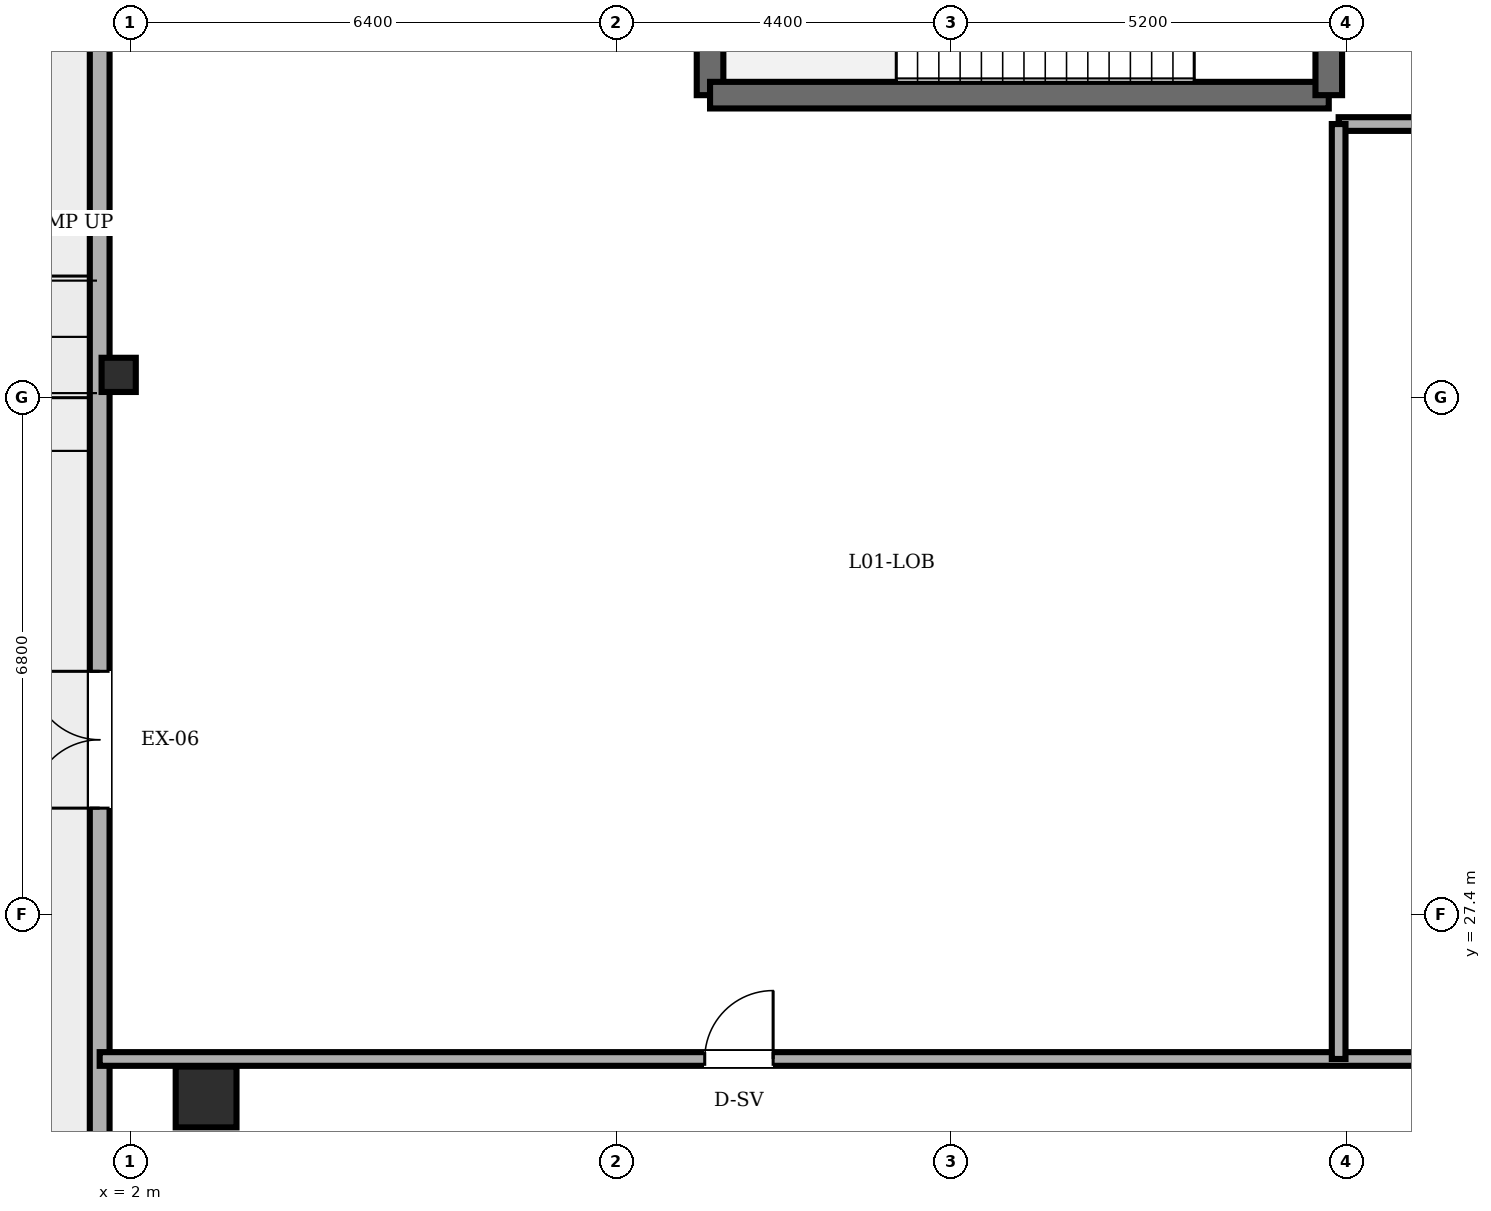
"""IFC4 building model, lengths in metres.
Left out: names, types, materials, properties, quantities, classifications, styles, units other than length and angle.
Written with IfcOpenShell. Run it as: python <this file> out.ifc"""

import sys

from ifc_helpers import new_model, si_unit, direction, frame, frame_2d, origin, origin_2d, place, context, subcontext, project, spatial, rectangle, extrude, element, fill, save


model = new_model("IFC4")
c1 = context("Model", 3, precision=1e-05, world=origin(), true_north=direction((0.0, 1.0)))
c2 = subcontext(c1, "Body", "Model", "MODEL_VIEW")
j1 = project(units=[si_unit("LENGTHUNIT", "METRE"), si_unit("PLANEANGLEUNIT", "RADIAN")], contexts=[c1])
p1 = place(None, origin())
s1 = spatial("IfcSite", under=j1, at=p1, CompositionType="ELEMENT")
p2 = place(p1, origin())
s2 = spatial("IfcBuilding", under=s1, at=p2, CompositionType="ELEMENT")
p3 = place(p2, origin())
s3 = spatial("IfcBuildingStorey", under=s2, at=p3, CompositionType="ELEMENT", Elevation=0.0)
p4 = place(p3, frame((3.0, 25.0, 0.0), z_axis=(0.0, 0.0, 1.0), x_axis=(1.0, 0.0, 0.0)))
e1 = element("IfcColumn", 1, at=p4, inside=s3, PredefinedType="COLUMN", context=c2, shape_type="SweptSolid", body=[
    extrude(rectangle(XDim=0.8, YDim=0.8, at=origin_2d()), origin(), (0.0, 0.0, 1.0), 5.4),
])
p5 = place(p3, frame((1.85, 34.5, 0.0), z_axis=(0.0, 0.0, 1.0), x_axis=(1.0, 0.0, 0.0)))
e2 = element("IfcColumn", 2, at=p5, inside=s3, PredefinedType="PILASTER", context=c2, shape_type="SweptSolid", body=[
    extrude(rectangle(XDim=0.45, YDim=0.45, at=origin_2d()), origin(), (0.0, 0.0, 1.0), 5.18),
])
p6 = place(p3, frame((1.6, 0.2, 0.0), z_axis=(0.0, 0.0, 1.0), x_axis=(0.0, 1.0, 0.0)))
e3 = element("IfcWall", 3, at=p6, inside=s3, PredefinedType="SOLIDWALL", context=c2, shape_type="SweptSolid", body=[
    extrude(rectangle(XDim=47.6, YDim=0.26, at=frame_2d((23.8, 0.0))), origin(), (0.0, 0.0, 1.0), 5.18),
])
p7 = place(p6, frame((9.1, 0.0, 0.0)))
e4 = element("IfcOpeningElement", 4, at=p7, cuts=e3, PredefinedType="OPENING", context=c2, shape_type="SweptSolid", body=[
    extrude(rectangle(XDim=4.2, YDim=3.6, at=frame_2d((2.1, 1.8))), frame((0.0, 0.14, 0.0), z_axis=(0.0, -1.0, 0.0), x_axis=(1.0, 0.0, 0.0)), (0.0, 0.0, 1.0), 0.28),
])
p8 = place(p6, frame((21.5, 0.0, 0.0)))
e5 = element("IfcOpeningElement", 5, at=p8, cuts=e3, PredefinedType="OPENING", context=c2, shape_type="SweptSolid", body=[
    extrude(rectangle(XDim=2.0, YDim=2.5, at=frame_2d((1.0, 1.25))), frame((0.0, 0.14, 0.0), z_axis=(0.0, -1.0, 0.0), x_axis=(1.0, 0.0, 0.0)), (0.0, 0.0, 1.0), 0.28),
])
p9 = place(p6, frame((28.6, 0.0, 0.0)))
e6 = element("IfcOpeningElement", 6, at=p9, cuts=e3, PredefinedType="OPENING", context=c2, shape_type="SweptSolid", body=[
    extrude(rectangle(XDim=1.8, YDim=2.4, at=frame_2d((0.9, 1.2))), frame((0.0, 0.14, 0.0), z_axis=(0.0, -1.0, 0.0), x_axis=(1.0, 0.0, 0.0)), (0.0, 0.0, 1.0), 0.28),
])
p10 = place(p6, frame((18.0, 0.0, 0.0)))
e7 = element("IfcOpeningElement", 7, at=p10, cuts=e3, PredefinedType="OPENING", context=c2, shape_type="SweptSolid", body=[
    extrude(rectangle(XDim=1.8, YDim=2.4, at=frame_2d((0.9, 1.2))), frame((0.0, 0.14, 0.0), z_axis=(0.0, -1.0, 0.0), x_axis=(1.0, 0.0, 0.0)), (0.0, 0.0, 1.0), 0.28),
])
p11 = place(p3, frame((9.63, 38.18, 0.0), z_axis=(0.0, 0.0, 1.0), x_axis=(0.0, 1.0, 0.0)))
e8 = element("IfcWall", 8, at=p11, inside=s3, PredefinedType="SOLIDWALL", context=c2, shape_type="SweptSolid", body=[
    extrude(rectangle(XDim=3.64, YDim=0.35, at=frame_2d((1.82, 0.0))), origin(), (0.0, 0.0, 1.0), 5.4),
])
p12 = place(p3, frame((17.77, 38.18, 0.0), z_axis=(0.0, 0.0, 1.0), x_axis=(-1.0, 0.0, 0.0)))
e9 = element("IfcWall", 9, at=p12, inside=s3, PredefinedType="SOLIDWALL", context=c2, shape_type="SweptSolid", body=[
    extrude(rectangle(XDim=8.14, YDim=0.35, at=frame_2d((4.07, 0.0))), origin(), (0.0, 0.0, 1.0), 5.4),
])
p13 = place(p3, frame((17.77, 38.18, 0.0), z_axis=(0.0, 0.0, 1.0), x_axis=(0.0, 1.0, 0.0)))
e10 = element("IfcWall", 10, at=p13, inside=s3, PredefinedType="SOLIDWALL", context=c2, shape_type="SweptSolid", body=[
    extrude(rectangle(XDim=3.64, YDim=0.35, at=frame_2d((1.82, 0.0))), origin(), (0.0, 0.0, 1.0), 5.4),
])
p14 = place(p13, frame((1.25, 0.0, 0.0)))
e11 = element("IfcOpeningElement", 11, at=p14, cuts=e10, PredefinedType="OPENING", context=c2, shape_type="SweptSolid", body=[
    extrude(rectangle(XDim=1.1, YDim=2.15, at=frame_2d((0.55, 1.075))), frame((0.0, 0.185, 0.0), z_axis=(0.0, -1.0, 0.0), x_axis=(1.0, 0.0, 0.0)), (0.0, 0.0, 1.0), 0.37),
])
p15 = place(p3, frame((1.6, 25.5, 0.0), z_axis=(0.0, 0.0, 1.0), x_axis=(1.0, 0.0, 0.0)))
e12 = element("IfcWall", 12, at=p15, inside=s3, PredefinedType="PARTITIONING", context=c2, shape_type="SweptSolid", body=[
    extrude(rectangle(XDim=19.88, YDim=0.18, at=frame_2d((9.94, 0.0))), origin(), (0.0, 0.0, 1.0), 5.18),
])
p16 = place(p15, frame((7.96, 0.0, 0.0)))
e13 = element("IfcOpeningElement", 13, at=p16, cuts=e12, PredefinedType="OPENING", context=c2, shape_type="SweptSolid", body=[
    extrude(rectangle(XDim=0.9, YDim=2.05, at=frame_2d((0.45, 1.025))), frame((0.0, 0.1, 0.0), z_axis=(0.0, -1.0, 0.0), x_axis=(1.0, 0.0, 0.0)), (0.0, 0.0, 1.0), 0.2),
])
p17 = place(p3, frame((17.9, 37.8, 0.0), z_axis=(0.0, 0.0, 1.0), x_axis=(1.0, 0.0, 0.0)))
e14 = element("IfcWall", 14, at=p17, inside=s3, PredefinedType="PARTITIONING", context=c2, shape_type="SweptSolid", body=[
    extrude(rectangle(XDim=2.6, YDim=0.18, at=frame_2d((1.3, 0.0))), origin(), (0.0, 0.0, 1.0), 5.18),
])
p18 = place(p3, frame((17.9, 25.5, 0.0), z_axis=(0.0, 0.0, 1.0), x_axis=(0.0, 1.0, 0.0)))
e15 = element("IfcWall", 15, at=p18, inside=s3, PredefinedType="PARTITIONING", context=c2, shape_type="SweptSolid", body=[
    extrude(rectangle(XDim=12.3, YDim=0.18, at=frame_2d((6.15, 0.0))), origin(), (0.0, 0.0, 1.0), 5.18),
])
p19 = place(p9, origin())
e16 = element("IfcDoor", 16, at=p19, inside=s3, OperationType="DOUBLE_DOOR_SINGLE_SWING", PredefinedType="DOOR", context=c2, shape_type="SweptSolid", body=[
    extrude(rectangle(XDim=1.8, YDim=2.4, at=frame_2d((0.9, 1.2))), frame((0.0, 0.025, 0.0), z_axis=(0.0, -1.0, 0.0), x_axis=(1.0, 0.0, 0.0)), (0.0, 0.0, 1.0), 0.05),
])
fill(e6, e16)
p20 = place(p16, origin())
e17 = element("IfcDoor", 17, at=p20, inside=s3, OperationType="SINGLE_SWING_RIGHT", PredefinedType="DOOR", context=c2, shape_type="SweptSolid", body=[
    extrude(rectangle(XDim=0.9, YDim=2.05, at=frame_2d((0.45, 1.025))), frame((0.0, 0.025, 0.0), z_axis=(0.0, -1.0, 0.0), x_axis=(1.0, 0.0, 0.0)), (0.0, 0.0, 1.0), 0.05),
])
fill(e13, e17)
save(model, sys.argv[1])
